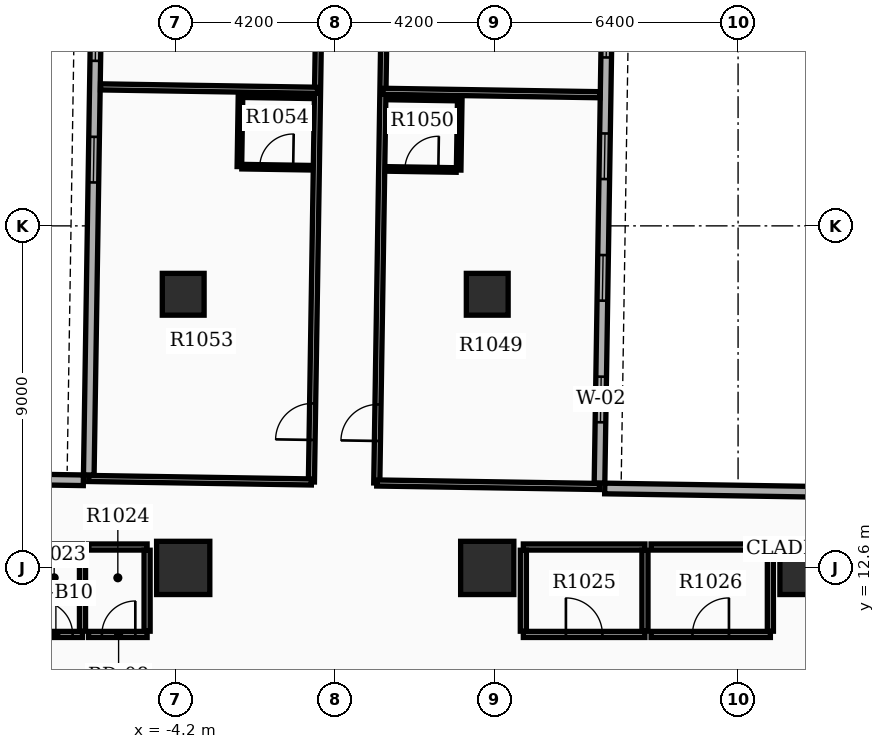
"""IFC4 building model, lengths in metres.
Left out: names, types, materials, properties, quantities, classifications, styles, units other than length and angle.
Written with IfcOpenShell. Run it as: python <this file> out.ifc"""

import sys

from ifc_helpers import new_model, si_unit, direction, frame, frame_2d, origin, origin_2d, place, context, subcontext, project, spatial, rectangle, extrude, element, fill, save


model = new_model("IFC4")
c1 = context("Model", 3, precision=1e-05, world=origin(), true_north=direction((0.0, 1.0)))
c2 = subcontext(c1, "Body", "Model", "MODEL_VIEW")
j1 = project(units=[si_unit("LENGTHUNIT", "METRE"), si_unit("PLANEANGLEUNIT", "RADIAN")], contexts=[c1])
p1 = place(None, origin())
s1 = spatial("IfcSite", under=j1, at=p1, CompositionType="ELEMENT")
p2 = place(p1, origin())
s2 = spatial("IfcBuilding", under=s1, at=p2, CompositionType="ELEMENT")
p3 = place(p2, frame((0.0, 0.0, 67.8)))
s3 = spatial("IfcBuildingStorey", under=s2, at=p3, CompositionType="ELEMENT", Elevation=67.8)
for number, where, z_axis, x_axis in (
    (1, (12.4, 12.6, 0.0), (0.0, 0.0, 1.0), (1.0, 0.0, 0.0)),
    (2, (4.0, 12.6, 0.0), (0.0, 0.0, 1.0), (1.0, 0.0, 0.0)),
    (3, (-4.0, 12.6, 0.0), (0.0, 0.0, 1.0), (1.0, 0.0, 0.0)),
):
    element("IfcColumn", number, at=place(p3, frame(where, z_axis=z_axis, x_axis=x_axis)), inside=s3, PredefinedType="COLUMN", context=c2, shape_type="SweptSolid", body=[
        extrude(rectangle(XDim=1.4, YDim=1.4, at=origin_2d()), origin(), (0.0, 0.0, 1.0), 3.9),
    ])
for number, where, z_axis, x_axis in (
    (4, (-4.0, 19.8, 0.0), (0.0, 0.0, 1.0), (1.0, 0.0, 0.0)),
    (5, (4.0, 19.8, 0.0), (0.0, 0.0, 1.0), (1.0, 0.0, 0.0)),
):
    element("IfcColumn", number, at=place(p3, frame(where, z_axis=z_axis, x_axis=x_axis)), inside=s3, PredefinedType="COLUMN", context=c2, shape_type="SweptSolid", body=[
        extrude(rectangle(XDim=1.1, YDim=1.1, at=origin_2d()), origin(), (0.0, 0.0, 1.0), 3.9),
    ])
p4 = place(p3, frame((6.954, 14.833, 0.0), z_axis=(0.0, 0.0, 1.0), x_axis=(0.015705059908, 0.999876667941, 0.0)))
e6 = element("IfcWall", 6, at=p4, inside=s3, PredefinedType="STANDARD", context=c2, shape_type="SweptSolid", body=[
    extrude(rectangle(XDim=20.1, YDim=0.28, at=frame_2d((10.05, 0.0))), origin(), (0.0, 0.0, 1.0), 2.91),
])
p5 = place(p4, frame((1.6, 0.0, 0.8)))
e7 = element("IfcOpeningElement", 7, at=p5, cuts=e6, PredefinedType="OPENING", context=c2, shape_type="SweptSolid", body=[
    extrude(rectangle(XDim=1.2, YDim=1.6, at=frame_2d((0.6, 0.8))), frame((0.0, 0.15, 0.0), z_axis=(0.0, -1.0, 0.0), x_axis=(1.0, 0.0, 0.0)), (0.0, 0.0, 1.0), 0.3),
])
p6 = place(p4, frame((4.8, 0.0, 0.8)))
e8 = element("IfcOpeningElement", 8, at=p6, cuts=e6, PredefinedType="OPENING", context=c2, shape_type="SweptSolid", body=[
    extrude(rectangle(XDim=1.2, YDim=1.6, at=frame_2d((0.6, 0.8))), frame((0.0, 0.15, 0.0), z_axis=(0.0, -1.0, 0.0), x_axis=(1.0, 0.0, 0.0)), (0.0, 0.0, 1.0), 0.3),
])
p7 = place(p4, frame((8.0, 0.0, 0.8)))
e9 = element("IfcOpeningElement", 9, at=p7, cuts=e6, PredefinedType="OPENING", context=c2, shape_type="SweptSolid", body=[
    extrude(rectangle(XDim=1.2, YDim=1.6, at=frame_2d((0.6, 0.8))), frame((0.0, 0.15, 0.0), z_axis=(0.0, -1.0, 0.0), x_axis=(1.0, 0.0, 0.0)), (0.0, 0.0, 1.0), 0.3),
])
p8 = place(p4, frame((11.2, 0.0, 0.8)))
e10 = element("IfcOpeningElement", 10, at=p8, cuts=e6, PredefinedType="OPENING", context=c2, shape_type="SweptSolid", body=[
    extrude(rectangle(XDim=1.2, YDim=1.6, at=frame_2d((0.6, 0.8))), frame((0.0, 0.15, 0.0), z_axis=(0.0, -1.0, 0.0), x_axis=(1.0, 0.0, 0.0)), (0.0, 0.0, 1.0), 0.3),
])
p9 = place(p3, frame((-6.169, 35.141, 0.0), z_axis=(0.0, 0.0, 1.0), x_axis=(-0.01571739401, -0.999876474133, 0.0)))
e11 = element("IfcWall", 11, at=p9, inside=s3, PredefinedType="STANDARD", context=c2, shape_type="SweptSolid", body=[
    extrude(rectangle(XDim=20.1, YDim=0.28, at=frame_2d((10.05, 0.0))), origin(), (0.0, 0.0, 1.0), 2.91),
])
p10 = place(p9, frame((1.6, 0.0, 0.8)))
e12 = element("IfcOpeningElement", 12, at=p10, cuts=e11, PredefinedType="OPENING", context=c2, shape_type="SweptSolid", body=[
    extrude(rectangle(XDim=1.2, YDim=1.6, at=frame_2d((0.6, 0.8))), frame((0.0, 0.15, 0.0), z_axis=(0.0, -1.0, 0.0), x_axis=(1.0, 0.0, 0.0)), (0.0, 0.0, 1.0), 0.3),
])
p11 = place(p9, frame((4.8, 0.0, 0.8)))
e13 = element("IfcOpeningElement", 13, at=p11, cuts=e11, PredefinedType="OPENING", context=c2, shape_type="SweptSolid", body=[
    extrude(rectangle(XDim=1.2, YDim=1.6, at=frame_2d((0.6, 0.8))), frame((0.0, 0.15, 0.0), z_axis=(0.0, -1.0, 0.0), x_axis=(1.0, 0.0, 0.0)), (0.0, 0.0, 1.0), 0.3),
])
p12 = place(p9, frame((8.0, 0.0, 0.8)))
e14 = element("IfcOpeningElement", 14, at=p12, cuts=e11, PredefinedType="OPENING", context=c2, shape_type="SweptSolid", body=[
    extrude(rectangle(XDim=1.2, YDim=1.6, at=frame_2d((0.6, 0.8))), frame((0.0, 0.15, 0.0), z_axis=(0.0, -1.0, 0.0), x_axis=(1.0, 0.0, 0.0)), (0.0, 0.0, 1.0), 0.3),
])
p13 = place(p9, frame((11.2, 0.0, 0.8)))
e15 = element("IfcOpeningElement", 15, at=p13, cuts=e11, PredefinedType="OPENING", context=c2, shape_type="SweptSolid", body=[
    extrude(rectangle(XDim=1.2, YDim=1.6, at=frame_2d((0.6, 0.8))), frame((0.0, 0.15, 0.0), z_axis=(0.0, -1.0, 0.0), x_axis=(1.0, 0.0, 0.0)), (0.0, 0.0, 1.0), 0.3),
])
p14 = place(p3, frame((13.391, 14.592, 0.0), z_axis=(0.0, 0.0, 1.0), x_axis=(-0.999876833368, 0.015694524359, 0.0)))
e16 = element("IfcWall", 16, at=p14, inside=s3, PredefinedType="STANDARD", context=c2, shape_type="SweptSolid", body=[
    extrude(rectangle(XDim=6.3, YDim=0.28, at=frame_2d((3.15, 0.0))), origin(), (0.0, 0.0, 1.0), 2.91),
])
p15 = place(p3, frame((-12.926, 15.005, 0.0), z_axis=(0.0, 0.0, 1.0), x_axis=(0.999876823822, -0.015695132501, 0.0)))
e17 = element("IfcWall", 17, at=p15, inside=s3, PredefinedType="STANDARD", context=c2, shape_type="SweptSolid", body=[
    extrude(rectangle(XDim=6.3, YDim=0.28, at=frame_2d((3.15, 0.0))), origin(), (0.0, 0.0, 1.0), 2.91),
])
p16 = place(p3, frame((-8.14, 10.85, 0.0), z_axis=(0.0, 0.0, 1.0), x_axis=(1.0, 0.0, 0.0)))
e18 = element("IfcWall", 18, at=p16, inside=s3, PredefinedType="PARTITIONING", context=c2, shape_type="SweptSolid", body=[
    extrude(rectangle(XDim=1.49, YDim=0.16, at=frame_2d((0.745, 0.0))), origin(), (0.0, 0.0, 1.0), 2.9),
])
p17 = place(p16, frame((0.35, 0.0, 0.0)))
e19 = element("IfcOpeningElement", 19, at=p17, cuts=e18, PredefinedType="OPENING", context=c2, shape_type="SweptSolid", body=[
    extrude(rectangle(XDim=0.88, YDim=2.1, at=frame_2d((0.44, 1.05))), frame((0.0, 0.09, 0.0), z_axis=(0.0, -1.0, 0.0), x_axis=(1.0, 0.0, 0.0)), (0.0, 0.0, 1.0), 0.18),
])
p18 = place(p3, frame((-8.14, 13.15, 0.0), z_axis=(0.0, 0.0, 1.0), x_axis=(1.0, 0.0, 0.0)))
e20 = element("IfcWall", 20, at=p18, inside=s3, PredefinedType="PARTITIONING", context=c2, shape_type="SweptSolid", body=[
    extrude(rectangle(XDim=1.49, YDim=0.16, at=frame_2d((0.745, 0.0))), origin(), (0.0, 0.0, 1.0), 2.9),
])
p19 = place(p3, frame((-6.65, 10.935, 0.0), z_axis=(0.0, 0.0, 1.0), x_axis=(0.0, 1.0, 0.0)))
e21 = element("IfcWall", 21, at=p19, inside=s3, PredefinedType="PARTITIONING", context=c2, shape_type="SweptSolid", body=[
    extrude(rectangle(XDim=2.13, YDim=0.16, at=frame_2d((1.065, 0.0))), origin(), (0.0, 0.0, 1.0), 2.9),
])
p20 = place(p3, frame((-6.49, 10.85, 0.0), z_axis=(0.0, 0.0, 1.0), x_axis=(1.0, 0.0, 0.0)))
e22 = element("IfcWall", 22, at=p20, inside=s3, PredefinedType="PARTITIONING", context=c2, shape_type="SweptSolid", body=[
    extrude(rectangle(XDim=1.54, YDim=0.16, at=frame_2d((0.77, 0.0))), origin(), (0.0, 0.0, 1.0), 2.9),
])
p21 = place(p20, frame((0.35, 0.0, 0.0)))
e23 = element("IfcOpeningElement", 23, at=p21, cuts=e22, PredefinedType="OPENING", context=c2, shape_type="SweptSolid", body=[
    extrude(rectangle(XDim=0.88, YDim=2.15, at=frame_2d((0.44, 1.075))), frame((0.0, 0.09, 0.0), z_axis=(0.0, -1.0, 0.0), x_axis=(1.0, 0.0, 0.0)), (0.0, 0.0, 1.0), 0.18),
])
p22 = place(p3, frame((-6.49, 13.15, 0.0), z_axis=(0.0, 0.0, 1.0), x_axis=(1.0, 0.0, 0.0)))
e24 = element("IfcWall", 24, at=p22, inside=s3, PredefinedType="PARTITIONING", context=c2, shape_type="SweptSolid", body=[
    extrude(rectangle(XDim=1.54, YDim=0.16, at=frame_2d((0.77, 0.0))), origin(), (0.0, 0.0, 1.0), 2.9),
])
p23 = place(p3, frame((-4.95, 10.935, 0.0), z_axis=(0.0, 0.0, 1.0), x_axis=(0.0, 1.0, 0.0)))
e25 = element("IfcWall", 25, at=p23, inside=s3, PredefinedType="PARTITIONING", context=c2, shape_type="SweptSolid", body=[
    extrude(rectangle(XDim=2.13, YDim=0.16, at=frame_2d((1.065, 0.0))), origin(), (0.0, 0.0, 1.0), 2.9),
])
p24 = place(p3, frame((4.95, 10.85, 0.0), z_axis=(0.0, 0.0, 1.0), x_axis=(1.0, 0.0, 0.0)))
e26 = element("IfcWall", 26, at=p24, inside=s3, PredefinedType="PARTITIONING", context=c2, shape_type="SweptSolid", body=[
    extrude(rectangle(XDim=3.2, YDim=0.16, at=frame_2d((1.6, 0.0))), origin(), (0.0, 0.0, 1.0), 2.9),
])
p25 = place(p24, frame((1.12, 0.0, 0.0)))
e27 = element("IfcOpeningElement", 27, at=p25, cuts=e26, PredefinedType="OPENING", context=c2, shape_type="SweptSolid", body=[
    extrude(rectangle(XDim=0.96, YDim=2.15, at=frame_2d((0.48, 1.075))), frame((0.0, 0.09, 0.0), z_axis=(0.0, -1.0, 0.0), x_axis=(1.0, 0.0, 0.0)), (0.0, 0.0, 1.0), 0.18),
])
p26 = place(p3, frame((4.95, 13.15, 0.0), z_axis=(0.0, 0.0, 1.0), x_axis=(1.0, 0.0, 0.0)))
e28 = element("IfcWall", 28, at=p26, inside=s3, PredefinedType="PARTITIONING", context=c2, shape_type="SweptSolid", body=[
    extrude(rectangle(XDim=3.2, YDim=0.16, at=frame_2d((1.6, 0.0))), origin(), (0.0, 0.0, 1.0), 2.9),
])
for number, where, z_axis, x_axis in (
    (29, (4.95, 10.935, 0.0), (0.0, 0.0, 1.0), (0.0, 1.0, 0.0)),
    (30, (8.15, 10.935, 0.0), (0.0, 0.0, 1.0), (0.0, 1.0, 0.0)),
):
    element("IfcWall", number, at=place(p3, frame(where, z_axis=z_axis, x_axis=x_axis)), inside=s3, PredefinedType="PARTITIONING", context=c2, shape_type="SweptSolid", body=[
        extrude(rectangle(XDim=2.13, YDim=0.16, at=frame_2d((1.065, 0.0))), origin(), (0.0, 0.0, 1.0), 2.9),
    ])
p27 = place(p3, frame((8.31, 10.85, 0.0), z_axis=(0.0, 0.0, 1.0), x_axis=(1.0, 0.0, 0.0)))
e31 = element("IfcWall", 31, at=p27, inside=s3, PredefinedType="PARTITIONING", context=c2, shape_type="SweptSolid", body=[
    extrude(rectangle(XDim=3.14, YDim=0.16, at=frame_2d((1.57, 0.0))), origin(), (0.0, 0.0, 1.0), 2.9),
])
p28 = place(p27, frame((1.09, 0.0, 0.0)))
e32 = element("IfcOpeningElement", 32, at=p28, cuts=e31, PredefinedType="OPENING", context=c2, shape_type="SweptSolid", body=[
    extrude(rectangle(XDim=0.96, YDim=2.15, at=frame_2d((0.48, 1.075))), frame((0.0, 0.09, 0.0), z_axis=(0.0, -1.0, 0.0), x_axis=(1.0, 0.0, 0.0)), (0.0, 0.0, 1.0), 0.18),
])
p29 = place(p3, frame((8.31, 13.15, 0.0), z_axis=(0.0, 0.0, 1.0), x_axis=(1.0, 0.0, 0.0)))
e33 = element("IfcWall", 33, at=p29, inside=s3, PredefinedType="PARTITIONING", context=c2, shape_type="SweptSolid", body=[
    extrude(rectangle(XDim=3.14, YDim=0.16, at=frame_2d((1.57, 0.0))), origin(), (0.0, 0.0, 1.0), 2.9),
])
p30 = place(p3, frame((11.45, 10.935, 0.0), z_axis=(0.0, 0.0, 1.0), x_axis=(0.0, 1.0, 0.0)))
e34 = element("IfcWall", 34, at=p30, inside=s3, PredefinedType="PARTITIONING", context=c2, shape_type="SweptSolid", body=[
    extrude(rectangle(XDim=2.13, YDim=0.16, at=frame_2d((1.065, 0.0))), origin(), (0.0, 0.0, 1.0), 2.9),
])
p31 = place(p3, frame((1.093, 14.835, 0.0), z_axis=(0.0, 0.0, 1.0), x_axis=(0.015713987169, 0.999876527681, 0.0)))
e35 = element("IfcWall", 35, at=p31, inside=s3, PredefinedType="PARTITIONING", context=c2, shape_type="SweptSolid", body=[
    extrude(rectangle(XDim=20.182, YDim=0.16, at=frame_2d((10.091, 0.0))), origin(), (0.0, 0.0, 1.0), 2.9),
])
p32 = place(p31, frame((1.106, 0.0, 0.0)))
e36 = element("IfcOpeningElement", 36, at=p32, cuts=e35, PredefinedType="OPENING", context=c2, shape_type="SweptSolid", body=[
    extrude(rectangle(XDim=0.96, YDim=2.15, at=frame_2d((0.48, 1.075))), frame((0.0, 0.09, 0.0), z_axis=(0.0, -1.0, 0.0), x_axis=(1.0, 0.0, 0.0)), (0.0, 0.0, 1.0), 0.18),
])
p33 = place(p31, frame((16.28, 0.0, 0.0)))
e37 = element("IfcOpeningElement", 37, at=p33, cuts=e35, PredefinedType="OPENING", context=c2, shape_type="SweptSolid", body=[
    extrude(rectangle(XDim=0.96, YDim=2.15, at=frame_2d((0.48, 1.075))), frame((0.0, 0.09, 0.0), z_axis=(0.0, -1.0, 0.0), x_axis=(1.0, 0.0, 0.0)), (0.0, 0.0, 1.0), 0.18),
])
p34 = place(p3, frame((1.093, 14.835, 0.0), z_axis=(0.0, 0.0, 1.0), x_axis=(0.99987664696, -0.015706395663, 0.0)))
e38 = element("IfcWall", 38, at=p34, inside=s3, PredefinedType="PARTITIONING", context=c2, shape_type="SweptSolid", body=[
    extrude(rectangle(XDim=5.86, YDim=0.16, at=frame_2d((2.93, 0.0))), origin(), (0.0, 0.0, 1.0), 2.9),
])
p35 = place(p3, frame((1.255, 25.14, 0.0), z_axis=(0.0, 0.0, 1.0), x_axis=(0.999876298183, -0.0157285833, 0.0)))
e39 = element("IfcWall", 39, at=p35, inside=s3, PredefinedType="PARTITIONING", context=c2, shape_type="SweptSolid", body=[
    extrude(rectangle(XDim=5.712, YDim=0.16, at=frame_2d((2.856, 0.0))), origin(), (0.0, 0.0, 1.0), 2.9),
])
p36 = place(p3, frame((1.363, 23.098, 0.0), z_axis=(0.0, 0.0, 1.0), x_axis=(0.999876836305, -0.015694337248, 0.0)))
e40 = element("IfcWall", 40, at=p36, inside=s3, PredefinedType="PARTITIONING", context=c2, shape_type="SweptSolid", body=[
    extrude(rectangle(XDim=1.82, YDim=0.12, at=frame_2d((0.91, 0.0))), origin(), (0.0, 0.0, 1.0), 2.9),
])
p37 = place(p36, frame((0.47, 0.0, 0.0)))
e41 = element("IfcOpeningElement", 41, at=p37, cuts=e40, PredefinedType="OPENING", context=c2, shape_type="SweptSolid", body=[
    extrude(rectangle(XDim=0.88, YDim=2.1, at=frame_2d((0.44, 1.05))), frame((0.0, 0.07, 0.0), z_axis=(0.0, -1.0, 0.0), x_axis=(1.0, 0.0, 0.0)), (0.0, 0.0, 1.0), 0.14),
])
p38 = place(p3, frame((1.393, 24.978, 0.0), z_axis=(0.0, 0.0, 1.0), x_axis=(0.999876836305, -0.015694337248, 0.0)))
e42 = element("IfcWall", 42, at=p38, inside=s3, PredefinedType="PARTITIONING", context=c2, shape_type="SweptSolid", body=[
    extrude(rectangle(XDim=1.82, YDim=0.12, at=frame_2d((0.91, 0.0))), origin(), (0.0, 0.0, 1.0), 2.9),
])
p39 = place(p3, frame((3.248, 23.069, 0.0), z_axis=(0.0, 0.0, 1.0), x_axis=(0.015714386166, 0.99987652141, 0.0)))
e43 = element("IfcWall", 43, at=p39, inside=s3, PredefinedType="PARTITIONING", context=c2, shape_type="SweptSolid", body=[
    extrude(rectangle(XDim=1.88, YDim=0.12, at=frame_2d((0.94, 0.0))), origin(), (0.0, 0.0, 1.0), 2.9),
])
p40 = place(p3, frame((-0.627, 14.862, 0.0), z_axis=(0.0, 0.0, 1.0), x_axis=(0.015713987169, 0.999876527681, 0.0)))
e44 = element("IfcWall", 44, at=p40, inside=s3, PredefinedType="PARTITIONING", context=c2, shape_type="SweptSolid", body=[
    extrude(rectangle(XDim=20.182, YDim=0.16, at=frame_2d((10.091, 0.0))), origin(), (0.0, 0.0, 1.0), 2.9),
])
p41 = place(p40, frame((1.106, 0.0, 0.0)))
e45 = element("IfcOpeningElement", 45, at=p41, cuts=e44, PredefinedType="OPENING", context=c2, shape_type="SweptSolid", body=[
    extrude(rectangle(XDim=0.96, YDim=2.15, at=frame_2d((0.48, 1.075))), frame((0.0, 0.09, 0.0), z_axis=(0.0, -1.0, 0.0), x_axis=(1.0, 0.0, 0.0)), (0.0, 0.0, 1.0), 0.18),
])
p42 = place(p40, frame((16.28, 0.0, 0.0)))
e46 = element("IfcOpeningElement", 46, at=p42, cuts=e44, PredefinedType="OPENING", context=c2, shape_type="SweptSolid", body=[
    extrude(rectangle(XDim=0.96, YDim=2.15, at=frame_2d((0.48, 1.075))), frame((0.0, 0.09, 0.0), z_axis=(0.0, -1.0, 0.0), x_axis=(1.0, 0.0, 0.0)), (0.0, 0.0, 1.0), 0.18),
])
p43 = place(p3, frame((-0.627, 14.862, 0.0), z_axis=(0.0, 0.0, 1.0), x_axis=(-0.999877290141, 0.015665396937, 0.0)))
e47 = element("IfcWall", 47, at=p43, inside=s3, PredefinedType="PARTITIONING", context=c2, shape_type="SweptSolid", body=[
    extrude(rectangle(XDim=5.86, YDim=0.16, at=frame_2d((2.93, 0.0))), origin(), (0.0, 0.0, 1.0), 2.9),
])
p44 = place(p3, frame((-0.465, 25.167, 0.0), z_axis=(0.0, 0.0, 1.0), x_axis=(-0.999876969438, 0.015685853115, 0.0)))
e48 = element("IfcWall", 48, at=p44, inside=s3, PredefinedType="PARTITIONING", context=c2, shape_type="SweptSolid", body=[
    extrude(rectangle(XDim=5.712, YDim=0.16, at=frame_2d((2.856, 0.0))), origin(), (0.0, 0.0, 1.0), 2.9),
])
p45 = place(p3, frame((-2.457, 23.158, 0.0), z_axis=(0.0, 0.0, 1.0), x_axis=(0.999876836305, -0.015694337248, 0.0)))
e49 = element("IfcWall", 49, at=p45, inside=s3, PredefinedType="PARTITIONING", context=c2, shape_type="SweptSolid", body=[
    extrude(rectangle(XDim=1.82, YDim=0.12, at=frame_2d((0.91, 0.0))), origin(), (0.0, 0.0, 1.0), 2.9),
])
p46 = place(p45, frame((0.47, 0.0, 0.0)))
e50 = element("IfcOpeningElement", 50, at=p46, cuts=e49, PredefinedType="OPENING", context=c2, shape_type="SweptSolid", body=[
    extrude(rectangle(XDim=0.88, YDim=2.1, at=frame_2d((0.44, 1.05))), frame((0.0, 0.07, 0.0), z_axis=(0.0, -1.0, 0.0), x_axis=(1.0, 0.0, 0.0)), (0.0, 0.0, 1.0), 0.14),
])
p47 = place(p3, frame((-2.427, 25.038, 0.0), z_axis=(0.0, 0.0, 1.0), x_axis=(0.999876836305, -0.015694337248, 0.0)))
e51 = element("IfcWall", 51, at=p47, inside=s3, PredefinedType="PARTITIONING", context=c2, shape_type="SweptSolid", body=[
    extrude(rectangle(XDim=1.82, YDim=0.12, at=frame_2d((0.91, 0.0))), origin(), (0.0, 0.0, 1.0), 2.9),
])
p48 = place(p3, frame((-2.521, 23.159, 0.0), z_axis=(0.0, 0.0, 1.0), x_axis=(0.01571234584, 0.999876553475, 0.0)))
e52 = element("IfcWall", 52, at=p48, inside=s3, PredefinedType="PARTITIONING", context=c2, shape_type="SweptSolid", body=[
    extrude(rectangle(XDim=1.88, YDim=0.12, at=frame_2d((0.94, 0.0))), origin(), (0.0, 0.0, 1.0), 2.9),
])
p49 = place(p5, origin())
e53 = element("IfcWindow", 53, at=p49, inside=s3, PartitioningType="SINGLE_PANEL", PredefinedType="WINDOW", context=c2, shape_type="SweptSolid", body=[
    extrude(rectangle(XDim=1.2, YDim=1.6, at=frame_2d((0.6, 0.8))), frame((0.0, 0.03, 0.0), z_axis=(0.0, -1.0, 0.0), x_axis=(1.0, 0.0, 0.0)), (0.0, 0.0, 1.0), 0.06),
])
fill(e7, e53)
p50 = place(p6, origin())
e54 = element("IfcWindow", 54, at=p50, inside=s3, PartitioningType="SINGLE_PANEL", PredefinedType="WINDOW", context=c2, shape_type="SweptSolid", body=[
    extrude(rectangle(XDim=1.2, YDim=1.6, at=frame_2d((0.6, 0.8))), frame((0.0, 0.03, 0.0), z_axis=(0.0, -1.0, 0.0), x_axis=(1.0, 0.0, 0.0)), (0.0, 0.0, 1.0), 0.06),
])
fill(e8, e54)
p51 = place(p7, origin())
e55 = element("IfcWindow", 55, at=p51, inside=s3, PartitioningType="SINGLE_PANEL", PredefinedType="WINDOW", context=c2, shape_type="SweptSolid", body=[
    extrude(rectangle(XDim=1.2, YDim=1.6, at=frame_2d((0.6, 0.8))), frame((0.0, 0.03, 0.0), z_axis=(0.0, -1.0, 0.0), x_axis=(1.0, 0.0, 0.0)), (0.0, 0.0, 1.0), 0.06),
])
fill(e9, e55)
p52 = place(p8, origin())
e56 = element("IfcWindow", 56, at=p52, inside=s3, PartitioningType="SINGLE_PANEL", PredefinedType="WINDOW", context=c2, shape_type="SweptSolid", body=[
    extrude(rectangle(XDim=1.2, YDim=1.6, at=frame_2d((0.6, 0.8))), frame((0.0, 0.03, 0.0), z_axis=(0.0, -1.0, 0.0), x_axis=(1.0, 0.0, 0.0)), (0.0, 0.0, 1.0), 0.06),
])
fill(e10, e56)
p53 = place(p12, origin())
e57 = element("IfcWindow", 57, at=p53, inside=s3, PartitioningType="SINGLE_PANEL", PredefinedType="WINDOW", context=c2, shape_type="SweptSolid", body=[
    extrude(rectangle(XDim=1.2, YDim=1.6, at=frame_2d((0.6, 0.8))), frame((0.0, 0.03, 0.0), z_axis=(0.0, -1.0, 0.0), x_axis=(1.0, 0.0, 0.0)), (0.0, 0.0, 1.0), 0.06),
])
fill(e14, e57)
p54 = place(p13, origin())
e58 = element("IfcWindow", 58, at=p54, inside=s3, PartitioningType="SINGLE_PANEL", PredefinedType="WINDOW", context=c2, shape_type="SweptSolid", body=[
    extrude(rectangle(XDim=1.2, YDim=1.6, at=frame_2d((0.6, 0.8))), frame((0.0, 0.03, 0.0), z_axis=(0.0, -1.0, 0.0), x_axis=(1.0, 0.0, 0.0)), (0.0, 0.0, 1.0), 0.06),
])
fill(e15, e58)
p55 = place(p17, origin())
e59 = element("IfcDoor", 59, at=p55, inside=s3, OperationType="SINGLE_SWING_LEFT", PredefinedType="DOOR", context=c2, shape_type="SweptSolid", body=[
    extrude(rectangle(XDim=0.88, YDim=2.1, at=frame_2d((0.44, 1.05))), frame((0.0, 0.025, 0.0), z_axis=(0.0, -1.0, 0.0), x_axis=(1.0, 0.0, 0.0)), (0.0, 0.0, 1.0), 0.05),
])
fill(e19, e59)
p56 = place(p21, origin())
e60 = element("IfcDoor", 60, at=p56, inside=s3, OperationType="SINGLE_SWING_RIGHT", PredefinedType="DOOR", context=c2, shape_type="SweptSolid", body=[
    extrude(rectangle(XDim=0.88, YDim=2.15, at=frame_2d((0.44, 1.075))), frame((0.0, 0.025, 0.0), z_axis=(0.0, -1.0, 0.0), x_axis=(1.0, 0.0, 0.0)), (0.0, 0.0, 1.0), 0.05),
])
fill(e23, e60)
p57 = place(p25, origin())
e61 = element("IfcDoor", 61, at=p57, inside=s3, OperationType="SINGLE_SWING_LEFT", PredefinedType="DOOR", context=c2, shape_type="SweptSolid", body=[
    extrude(rectangle(XDim=0.96, YDim=2.15, at=frame_2d((0.48, 1.075))), frame((0.0, 0.025, 0.0), z_axis=(0.0, -1.0, 0.0), x_axis=(1.0, 0.0, 0.0)), (0.0, 0.0, 1.0), 0.05),
])
fill(e27, e61)
p58 = place(p28, origin())
e62 = element("IfcDoor", 62, at=p58, inside=s3, OperationType="SINGLE_SWING_RIGHT", PredefinedType="DOOR", context=c2, shape_type="SweptSolid", body=[
    extrude(rectangle(XDim=0.96, YDim=2.15, at=frame_2d((0.48, 1.075))), frame((0.0, 0.025, 0.0), z_axis=(0.0, -1.0, 0.0), x_axis=(1.0, 0.0, 0.0)), (0.0, 0.0, 1.0), 0.05),
])
fill(e32, e62)
p59 = place(p32, origin())
e63 = element("IfcDoor", 63, at=p59, inside=s3, OperationType="SINGLE_SWING_LEFT", PredefinedType="DOOR", context=c2, shape_type="SweptSolid", body=[
    extrude(rectangle(XDim=0.96, YDim=2.15, at=frame_2d((0.48, 1.075))), frame((0.0, 0.025, 0.0), z_axis=(0.0, -1.0, 0.0), x_axis=(1.0, 0.0, 0.0)), (0.0, 0.0, 1.0), 0.05),
])
fill(e36, e63)
p60 = place(p37, origin())
e64 = element("IfcDoor", 64, at=p60, inside=s3, OperationType="SINGLE_SWING_RIGHT", PredefinedType="DOOR", context=c2, shape_type="SweptSolid", body=[
    extrude(rectangle(XDim=0.88, YDim=2.1, at=frame_2d((0.44, 1.05))), frame((0.0, 0.025, 0.0), z_axis=(0.0, -1.0, 0.0), x_axis=(1.0, 0.0, 0.0)), (0.0, 0.0, 1.0), 0.05),
])
fill(e41, e64)
p61 = place(p41, origin())
e65 = element("IfcDoor", 65, at=p61, inside=s3, OperationType="SINGLE_SWING_LEFT", PredefinedType="DOOR", context=c2, shape_type="SweptSolid", body=[
    extrude(rectangle(XDim=0.96, YDim=2.15, at=frame_2d((0.48, 1.075))), frame((0.0, 0.025, 0.0), z_axis=(0.0, -1.0, 0.0), x_axis=(1.0, 0.0, 0.0)), (0.0, 0.0, 1.0), 0.05),
])
fill(e45, e65)
p62 = place(p46, origin())
e66 = element("IfcDoor", 66, at=p62, inside=s3, OperationType="SINGLE_SWING_RIGHT", PredefinedType="DOOR", context=c2, shape_type="SweptSolid", body=[
    extrude(rectangle(XDim=0.88, YDim=2.1, at=frame_2d((0.44, 1.05))), frame((0.0, 0.025, 0.0), z_axis=(0.0, -1.0, 0.0), x_axis=(1.0, 0.0, 0.0)), (0.0, 0.0, 1.0), 0.05),
])
fill(e50, e66)
save(model, sys.argv[1])
